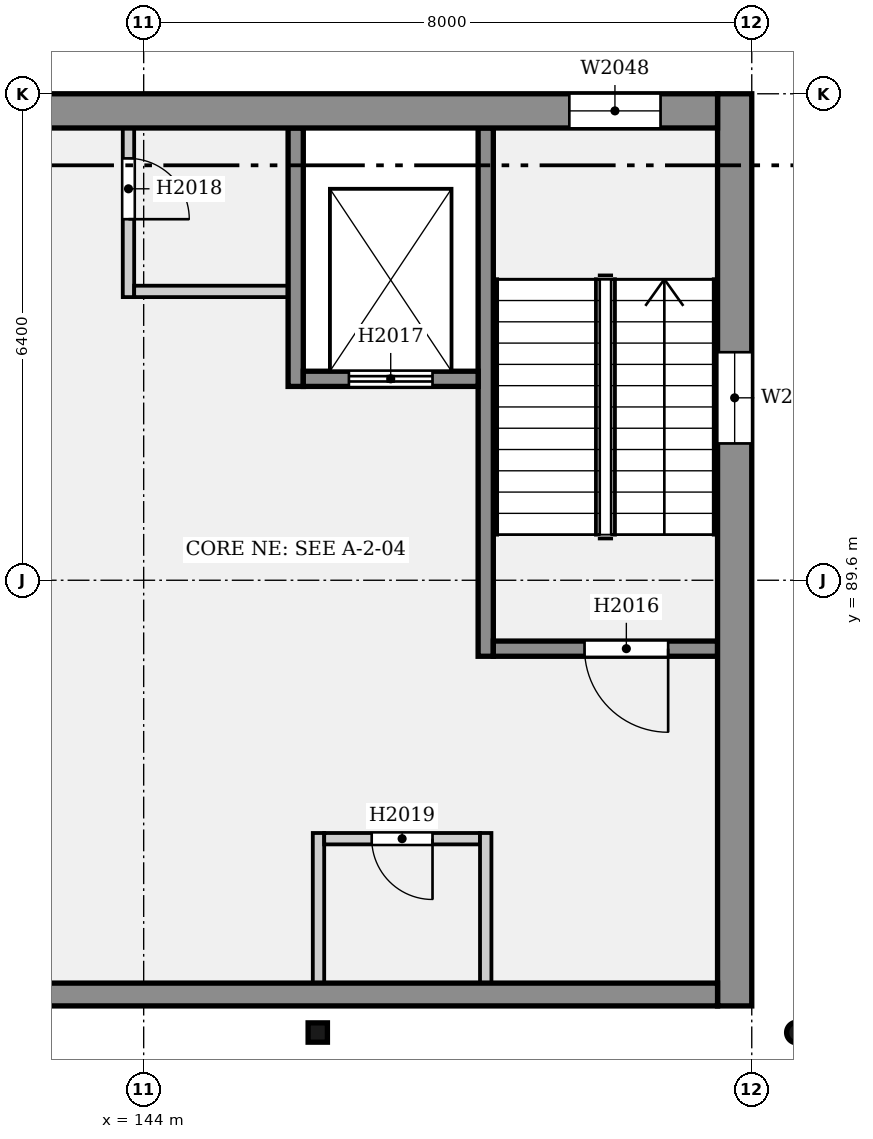
"""IFC4 building model, lengths in metres.
Left out: names, types, materials, properties, quantities, classifications, styles, units other than length and angle.
Written with IfcOpenShell. Run it as: python <this file> out.ifc"""

import sys

from ifc_helpers import new_model, si_unit, direction, frame, frame_2d, origin, origin_2d, place, context, subcontext, project, spatial, rectangle, hollow_rectangle, hollow_circle, extrude, element, fill, save


model = new_model("IFC4")
c1 = context("Model", 3, precision=1e-05, world=origin(), true_north=direction((0.0, 1.0)))
c2 = subcontext(c1, "Body", "Model", "MODEL_VIEW")
j1 = project(units=[si_unit("LENGTHUNIT", "METRE"), si_unit("PLANEANGLEUNIT", "RADIAN")], contexts=[c1])
p1 = place(None, origin())
s1 = spatial("IfcSite", under=j1, at=p1, CompositionType="ELEMENT")
p2 = place(p1, origin())
s2 = spatial("IfcBuilding", under=s1, at=p2, CompositionType="ELEMENT")
p3 = place(p2, frame((0.0, 0.0, 9.4)))
s3 = spatial("IfcBuildingStorey", under=s2, at=p3, CompositionType="ELEMENT", Elevation=9.4)
p4 = place(p3, frame((151.775, 96.0, 0.0), z_axis=(0.0, 0.0, 1.0), x_axis=(0.0, -1.0, 0.0)))
e1 = element("IfcWall", 1, at=p4, inside=s3, PredefinedType="ELEMENTEDWALL", context=c2, shape_type="SweptSolid", body=[
    extrude(rectangle(XDim=12.0, YDim=0.45, at=frame_2d((6.0, 0.0))), origin(), (0.0, 0.0, 1.0), 4.4),
])
p5 = place(p4, frame((3.4, 0.0, 0.6)))
e2 = element("IfcOpeningElement", 2, at=p5, cuts=e1, PredefinedType="OPENING", context=c2, shape_type="SweptSolid", body=[
    extrude(rectangle(XDim=1.2, YDim=3.0, at=frame_2d((0.6, 1.5))), frame((0.0, 0.235, 0.0), z_axis=(0.0, -1.0, 0.0), x_axis=(1.0, 0.0, 0.0)), (0.0, 0.0, 1.0), 0.47),
])
p6 = place(p3, frame((151.55, 95.775, 0.0), z_axis=(0.0, 0.0, 1.0), x_axis=(-1.0, 0.0, 0.0)))
e3 = element("IfcWall", 3, at=p6, inside=s3, PredefinedType="ELEMENTEDWALL", context=c2, shape_type="SweptSolid", body=[
    extrude(rectangle(XDim=11.55, YDim=0.45, at=frame_2d((5.775, 0.0))), origin(), (0.0, 0.0, 1.0), 4.4),
])
p7 = place(p6, frame((0.75, 0.0, 0.6)))
e4 = element("IfcOpeningElement", 4, at=p7, cuts=e3, PredefinedType="OPENING", context=c2, shape_type="SweptSolid", body=[
    extrude(rectangle(XDim=1.2, YDim=3.0, at=frame_2d((0.6, 1.5))), frame((0.0, 0.235, 0.0), z_axis=(0.0, -1.0, 0.0), x_axis=(1.0, 0.0, 0.0)), (0.0, 0.0, 1.0), 0.47),
])
p8 = place(p3, frame((151.55, 84.15, 0.0), z_axis=(0.0, 0.0, 1.0), x_axis=(-1.0, 0.0, 0.0)))
e5 = element("IfcWall", 5, at=p8, inside=s3, PredefinedType="SOLIDWALL", context=c2, shape_type="SweptSolid", body=[
    extrude(rectangle(XDim=11.55, YDim=0.3, at=frame_2d((5.775, 0.0))), origin(), (0.0, 0.0, 1.0), 4.4),
])
p9 = place(p3, frame((152.595, 83.65, 0.0), z_axis=(0.19937762145, 0.0, 0.979922733722), x_axis=(0.0, 1.0, 0.0)))
e6 = element("IfcColumn", 6, at=p9, inside=s3, PredefinedType="COLUMN", context=c2, shape_type="SweptSolid", body=[
    extrude(hollow_circle(Radius=0.136, WallThickness=0.013, at=origin_2d()), origin(), (0.0, 0.0, 1.0), 3.54),
])
p10 = place(p3, frame((146.29, 83.65, 0.0), z_axis=(0.0, 0.0, 1.0), x_axis=(1.0, 0.0, 0.0)))
e7 = element("IfcColumn", 7, at=p10, inside=s3, PredefinedType="COLUMN", context=c2, shape_type="SweptSolid", body=[
    extrude(hollow_rectangle(XDim=0.254, YDim=0.254, WallThickness=0.016, InnerFilletRadius=0.008, OuterFilletRadius=0.024, at=origin_2d()), origin(), (0.0, 0.0, 1.0), 3.496),
])
p11 = place(p3, frame((148.5, 95.55, 0.0), z_axis=(0.0, 0.0, 1.0), x_axis=(0.0, -1.0, 0.0)))
e8 = element("IfcWall", 8, at=p11, inside=s3, PredefinedType="SOLIDWALL", context=c2, shape_type="SweptSolid", body=[
    extrude(rectangle(XDim=6.95, YDim=0.2, at=frame_2d((3.475, 0.0))), origin(), (0.0, 0.0, 1.0), 4.4),
])
p12 = place(p3, frame((151.55, 88.7, 0.0), z_axis=(0.0, 0.0, 1.0), x_axis=(-1.0, 0.0, 0.0)))
e9 = element("IfcWall", 9, at=p12, inside=s3, PredefinedType="SOLIDWALL", context=c2, shape_type="SweptSolid", body=[
    extrude(rectangle(XDim=2.95, YDim=0.2, at=frame_2d((1.475, 0.0))), origin(), (0.0, 0.0, 1.0), 4.4),
])
p13 = place(p12, frame((0.65, 0.0, 0.0)))
e10 = element("IfcOpeningElement", 10, at=p13, cuts=e9, PredefinedType="OPENING", context=c2, shape_type="SweptSolid", body=[
    extrude(rectangle(XDim=1.1, YDim=2.1, at=frame_2d((0.55, 1.05))), frame((0.0, 0.11, 0.0), z_axis=(0.0, -1.0, 0.0), x_axis=(1.0, 0.0, 0.0)), (0.0, 0.0, 1.0), 0.22),
])
p14 = place(p3, frame((146.0, 95.55, 0.0), z_axis=(0.0, 0.0, 1.0), x_axis=(0.0, -1.0, 0.0)))
e11 = element("IfcWall", 11, at=p14, inside=s3, PredefinedType="SOLIDWALL", context=c2, shape_type="SweptSolid", body=[
    extrude(rectangle(XDim=3.4, YDim=0.2, at=frame_2d((1.7, 0.0))), origin(), (0.0, 0.0, 1.0), 4.4),
])
p15 = place(p3, frame((148.4, 92.25, 0.0), z_axis=(0.0, 0.0, 1.0), x_axis=(-1.0, 0.0, 0.0)))
e12 = element("IfcWall", 12, at=p15, inside=s3, PredefinedType="SOLIDWALL", context=c2, shape_type="SweptSolid", body=[
    extrude(rectangle(XDim=2.3, YDim=0.2, at=frame_2d((1.15, 0.0))), origin(), (0.0, 0.0, 1.0), 4.4),
])
p16 = place(p15, frame((0.6, 0.0, 0.0)))
e13 = element("IfcOpeningElement", 13, at=p16, cuts=e12, PredefinedType="OPENING", context=c2, shape_type="SweptSolid", body=[
    extrude(rectangle(XDim=1.1, YDim=2.1, at=frame_2d((0.55, 1.05))), frame((0.0, 0.11, 0.0), z_axis=(0.0, -1.0, 0.0), x_axis=(1.0, 0.0, 0.0)), (0.0, 0.0, 1.0), 0.22),
])
p17 = place(p3, frame((145.9, 93.4, 0.0), z_axis=(0.0, 0.0, 1.0), x_axis=(-1.0, 0.0, 0.0)))
e14 = element("IfcWall", 14, at=p17, inside=s3, PredefinedType="PARTITIONING", context=c2, shape_type="SweptSolid", body=[
    extrude(rectangle(XDim=2.025, YDim=0.15, at=frame_2d((1.012, 0.0))), origin(), (0.0, 0.0, 1.0), 4.15),
])
p18 = place(p3, frame((143.8, 95.55, 0.0), z_axis=(0.0, 0.0, 1.0), x_axis=(0.0, -1.0, 0.0)))
e15 = element("IfcWall", 15, at=p18, inside=s3, PredefinedType="PARTITIONING", context=c2, shape_type="SweptSolid", body=[
    extrude(rectangle(XDim=2.225, YDim=0.15, at=frame_2d((1.113, 0.0))), origin(), (0.0, 0.0, 1.0), 4.15),
])
p19 = place(p18, frame((0.4, 0.0, 0.0)))
e16 = element("IfcOpeningElement", 16, at=p19, cuts=e15, PredefinedType="OPENING", context=c2, shape_type="SweptSolid", body=[
    extrude(rectangle(XDim=0.8, YDim=2.1, at=frame_2d((0.4, 1.05))), frame((0.0, 0.085, 0.0), z_axis=(0.0, -1.0, 0.0), x_axis=(1.0, 0.0, 0.0)), (0.0, 0.0, 1.0), 0.17),
])
p20 = place(p3, frame((148.425, 86.2, 0.0), z_axis=(0.0, 0.0, 1.0), x_axis=(-1.0, 0.0, 0.0)))
e17 = element("IfcWall", 17, at=p20, inside=s3, PredefinedType="PARTITIONING", context=c2, shape_type="SweptSolid", body=[
    extrude(rectangle(XDim=2.05, YDim=0.15, at=frame_2d((1.025, 0.0))), origin(), (0.0, 0.0, 1.0), 4.15),
])
p21 = place(p20, frame((0.625, 0.0, 0.0)))
e18 = element("IfcOpeningElement", 18, at=p21, cuts=e17, PredefinedType="OPENING", context=c2, shape_type="SweptSolid", body=[
    extrude(rectangle(XDim=0.8, YDim=2.1, at=frame_2d((0.4, 1.05))), frame((0.0, 0.085, 0.0), z_axis=(0.0, -1.0, 0.0), x_axis=(1.0, 0.0, 0.0)), (0.0, 0.0, 1.0), 0.17),
])
for number, where, z_axis, x_axis in (
    (19, (148.5, 86.275, 0.0), (0.0, 0.0, 1.0), (0.0, -1.0, 0.0)),
    (20, (146.3, 86.275, 0.0), (0.0, 0.0, 1.0), (0.0, -1.0, 0.0)),
):
    element("IfcWall", number, at=place(p3, frame(where, z_axis=z_axis, x_axis=x_axis)), inside=s3, PredefinedType="PARTITIONING", context=c2, shape_type="SweptSolid", body=[
        extrude(rectangle(XDim=1.975, YDim=0.15, at=frame_2d((0.987, 0.0))), origin(), (0.0, 0.0, 1.0), 4.15),
    ])
p22 = place(p13, origin())
e21 = element("IfcDoor", 21, at=p22, inside=s3, OperationType="SINGLE_SWING_LEFT", PredefinedType="DOOR", context=c2, shape_type="SweptSolid", body=[
    extrude(rectangle(XDim=1.1, YDim=2.1, at=frame_2d((0.55, 1.05))), frame((0.0, 0.025, 0.0), z_axis=(0.0, -1.0, 0.0), x_axis=(1.0, 0.0, 0.0)), (0.0, 0.0, 1.0), 0.05),
])
fill(e10, e21)
p23 = place(p16, origin())
e22 = element("IfcDoor", 22, at=p23, inside=s3, OperationType="DOUBLE_DOOR_SLIDING", PredefinedType="DOOR", context=c2, shape_type="SweptSolid", body=[
    extrude(rectangle(XDim=1.1, YDim=2.1, at=frame_2d((0.55, 1.05))), frame((0.0, 0.025, 0.0), z_axis=(0.0, -1.0, 0.0), x_axis=(1.0, 0.0, 0.0)), (0.0, 0.0, 1.0), 0.05),
])
fill(e13, e22)
p24 = place(p19, origin())
e23 = element("IfcDoor", 23, at=p24, inside=s3, OperationType="SINGLE_SWING_RIGHT", PredefinedType="DOOR", context=c2, shape_type="SweptSolid", body=[
    extrude(rectangle(XDim=0.8, YDim=2.1, at=frame_2d((0.4, 1.05))), frame((0.0, 0.025, 0.0), z_axis=(0.0, -1.0, 0.0), x_axis=(1.0, 0.0, 0.0)), (0.0, 0.0, 1.0), 0.05),
])
fill(e16, e23)
p25 = place(p21, origin())
e24 = element("IfcDoor", 24, at=p25, inside=s3, OperationType="SINGLE_SWING_LEFT", PredefinedType="DOOR", context=c2, shape_type="SweptSolid", body=[
    extrude(rectangle(XDim=0.8, YDim=2.1, at=frame_2d((0.4, 1.05))), frame((0.0, 0.025, 0.0), z_axis=(0.0, -1.0, 0.0), x_axis=(1.0, 0.0, 0.0)), (0.0, 0.0, 1.0), 0.05),
])
fill(e18, e24)
p26 = place(p5, origin())
e25 = element("IfcWindow", 25, at=p26, inside=s3, PartitioningType="SINGLE_PANEL", PredefinedType="WINDOW", context=c2, shape_type="SweptSolid", body=[
    extrude(rectangle(XDim=1.2, YDim=3.0, at=frame_2d((0.6, 1.5))), frame((0.0, 0.03, 0.0), z_axis=(0.0, -1.0, 0.0), x_axis=(1.0, 0.0, 0.0)), (0.0, 0.0, 1.0), 0.06),
])
fill(e2, e25)
p27 = place(p7, origin())
e26 = element("IfcWindow", 26, at=p27, inside=s3, PartitioningType="SINGLE_PANEL", PredefinedType="WINDOW", context=c2, shape_type="SweptSolid", body=[
    extrude(rectangle(XDim=1.2, YDim=3.0, at=frame_2d((0.6, 1.5))), frame((0.0, 0.03, 0.0), z_axis=(0.0, -1.0, 0.0), x_axis=(1.0, 0.0, 0.0)), (0.0, 0.0, 1.0), 0.06),
])
fill(e4, e26)
save(model, sys.argv[1])
